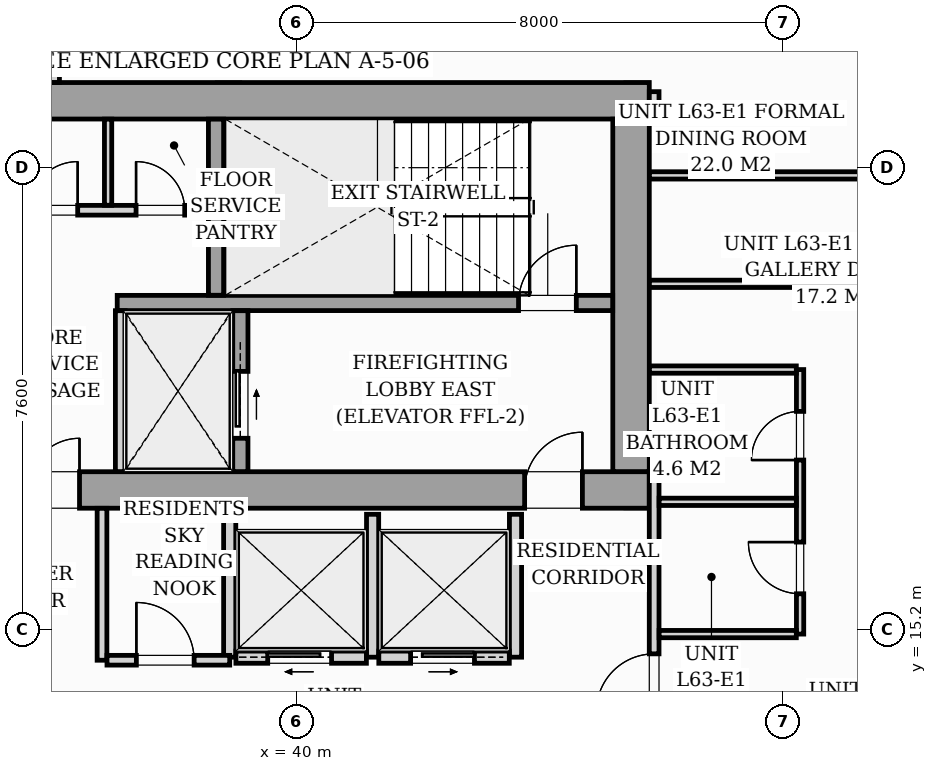
"""IFC4 building model, lengths in metres.
Left out: names, types, materials, properties, quantities, classifications, styles, units other than length and angle.
Written with IfcOpenShell. Run it as: python <this file> out.ifc"""

import sys

from ifc_helpers import new_model, si_unit, direction, frame, frame_2d, origin, origin_2d, place, context, subcontext, project, spatial, rectangle, i_section, extrude, source, transform, mapped, element, fill, save


model = new_model("IFC4")
c1 = context("Model", 3, precision=1e-05, world=origin(), true_north=direction((0.0, 1.0)))
c2 = subcontext(c1, "Body", "Model", "MODEL_VIEW")
j1 = project(units=[si_unit("LENGTHUNIT", "METRE"), si_unit("PLANEANGLEUNIT", "RADIAN")], contexts=[c1])
p1 = place(None, origin())
s1 = spatial("IfcSite", under=j1, at=p1, CompositionType="ELEMENT")
p2 = place(p1, origin())
s2 = spatial("IfcBuilding", under=s1, at=p2, CompositionType="ELEMENT")
p3 = place(p2, frame((0.0, 0.0, 219.9)))
s3 = spatial("IfcBuildingStorey", under=s2, at=p3, CompositionType="ELEMENT", Elevation=219.9)
m1 = source(origin(), c2, "Body", "SweptSolid", [
    extrude(i_section(OverallWidth=0.409, OverallDepth=0.425, WebThickness=0.033, FlangeThickness=0.052, FilletRadius=0.018, at=origin_2d()), origin(), (0.0, 0.0, 1.0), 3.296),
])
for number, where, z_axis, x_axis in (
    (1, (38.88, 17.4, 0.002), (0.0, 0.0, 1.0), (1.0, 0.0, 0.0)),
    (2, (45.6, 17.4, 0.002), (0.0, 0.0, 1.0), (1.0, 0.0, 0.0)),
    (3, (38.88, 24.0, 0.002), (0.0, 0.0, 1.0), (1.0, 0.0, 0.0)),
    (4, (45.6, 24.0, 0.002), (0.0, 0.0, 1.0), (1.0, 0.0, 0.0)),
):
    element("IfcColumn", number, at=place(p3, frame(where, z_axis=z_axis, x_axis=x_axis)), inside=s3, PredefinedType="PILASTER", context=c2, shape_type="MappedRepresentation", body=[
        mapped(m1, transform((0.0, 0.0, 0.0), scale=1.0)),
    ])
p4 = place(p3, frame((26.2, 17.5, 0.0), z_axis=(0.0, 0.0, 1.0), x_axis=(1.0, 0.0, 0.0)))
e5 = element("IfcWall", 5, at=p4, inside=s3, PredefinedType="SHEAR", context=c2, shape_type="SweptSolid", body=[
    extrude(rectangle(XDim=19.6, YDim=0.6, at=frame_2d((9.8, 0.0))), origin(), (0.0, 0.0, 1.0), 3.3),
])
p5 = place(p4, frame((0.95, 0.0, 0.0)))
e6 = element("IfcOpeningElement", 6, at=p5, cuts=e5, PredefinedType="OPENING", context=c2, shape_type="SweptSolid", body=[
    extrude(rectangle(XDim=0.95, YDim=2.06, at=frame_2d((0.475, 1.03))), frame((0.0, 0.31, 0.0), z_axis=(0.0, -1.0, 0.0), x_axis=(1.0, 0.0, 0.0)), (0.0, 0.0, 1.0), 0.62),
])
p6 = place(p4, frame((9.38, 0.0, 0.0)))
e7 = element("IfcOpeningElement", 7, at=p6, cuts=e5, PredefinedType="OPENING", context=c2, shape_type="SweptSolid", body=[
    extrude(rectangle(XDim=0.85, YDim=2.0, at=frame_2d((0.425, 1.0))), frame((0.0, 0.31, 0.0), z_axis=(0.0, -1.0, 0.0), x_axis=(1.0, 0.0, 0.0)), (0.0, 0.0, 1.0), 0.62),
])
p7 = place(p4, frame((17.55, 0.0, 0.0)))
e8 = element("IfcOpeningElement", 8, at=p7, cuts=e5, PredefinedType="OPENING", context=c2, shape_type="SweptSolid", body=[
    extrude(rectangle(XDim=0.95, YDim=2.06, at=frame_2d((0.475, 1.03))), frame((0.0, 0.31, 0.0), z_axis=(0.0, -1.0, 0.0), x_axis=(1.0, 0.0, 0.0)), (0.0, 0.0, 1.0), 0.62),
])
p8 = place(p3, frame((26.2, 23.9, 0.0), z_axis=(0.0, 0.0, 1.0), x_axis=(1.0, 0.0, 0.0)))
e9 = element("IfcWall", 9, at=p8, inside=s3, PredefinedType="SHEAR", context=c2, shape_type="SweptSolid", body=[
    extrude(rectangle(XDim=19.6, YDim=0.6, at=frame_2d((9.8, 0.0))), origin(), (0.0, 0.0, 1.0), 3.3),
])
p9 = place(p3, frame((45.5, 17.802, 0.0), z_axis=(0.0, 0.0, 1.0), x_axis=(0.0, 1.0, 0.0)))
e10 = element("IfcWall", 10, at=p9, inside=s3, PredefinedType="SHEAR", context=c2, shape_type="SweptSolid", body=[
    extrude(rectangle(XDim=5.796, YDim=0.6, at=frame_2d((2.898, 0.0))), origin(), (0.0, 0.0, 1.0), 3.3),
])
p10 = place(p3, frame((37.05, 20.575, 0.0), z_axis=(0.0, 0.0, 1.0), x_axis=(1.0, 0.0, 0.0)))
e11 = element("IfcWall", 11, at=p10, inside=s3, PredefinedType="SOLIDWALL", context=c2, shape_type="SweptSolid", body=[
    extrude(rectangle(XDim=8.148, YDim=0.25, at=frame_2d((4.074, 0.0))), origin(), (0.0, 0.0, 1.0), 3.3),
])
p11 = place(p10, frame((6.6, 0.0, 0.0)))
e12 = element("IfcOpeningElement", 12, at=p11, cuts=e11, PredefinedType="OPENING", context=c2, shape_type="SweptSolid", body=[
    extrude(rectangle(XDim=0.95, YDim=2.06, at=frame_2d((0.475, 1.03))), frame((0.0, 0.135, 0.0), z_axis=(0.0, -1.0, 0.0), x_axis=(1.0, 0.0, 0.0)), (0.0, 0.0, 1.0), 0.27),
])
p12 = place(p3, frame((38.675, 20.702, 0.0), z_axis=(0.0, 0.0, 1.0), x_axis=(0.0, 1.0, 0.0)))
e13 = element("IfcWall", 13, at=p12, inside=s3, PredefinedType="SOLIDWALL", context=c2, shape_type="SweptSolid", body=[
    extrude(rectangle(XDim=2.896, YDim=0.25, at=frame_2d((1.448, 0.0))), origin(), (0.0, 0.0, 1.0), 3.3),
])
p13 = place(p3, frame((37.1, 17.802, 0.0), z_axis=(0.0, 0.0, 1.0), x_axis=(0.0, 1.0, 0.0)))
e14 = element("IfcWall", 14, at=p13, inside=s3, PredefinedType="PARTITIONING", context=c2, shape_type="SweptSolid", body=[
    extrude(rectangle(XDim=2.646, YDim=0.16, at=frame_2d((1.323, 0.0))), origin(), (0.0, 0.0, 1.0), 3.04),
])
p14 = place(p3, frame((39.075, 17.802, 0.0), z_axis=(0.0, 0.0, 1.0), x_axis=(0.0, 1.0, 0.0)))
e15 = element("IfcWall", 15, at=p14, inside=s3, PredefinedType="SOLIDWALL", context=c2, shape_type="SweptSolid", body=[
    extrude(rectangle(XDim=2.646, YDim=0.25, at=frame_2d((1.323, 0.0))), origin(), (0.0, 0.0, 1.0), 3.3),
])
p15 = place(p14, frame((0.548, 0.0, 0.0)))
e16 = element("IfcOpeningElement", 16, at=p15, cuts=e15, PredefinedType="OPENING", context=c2, shape_type="SweptSolid", body=[
    extrude(rectangle(XDim=1.1, YDim=2.08, at=frame_2d((0.55, 1.04))), frame((0.0, 0.135, 0.0), z_axis=(0.0, -1.0, 0.0), x_axis=(1.0, 0.0, 0.0)), (0.0, 0.0, 1.0), 0.27),
])
p16 = place(p3, frame((33.452, 22.1, 0.0), z_axis=(0.0, 0.0, 1.0), x_axis=(1.0, 0.0, 0.0)))
e17 = element("IfcWall", 17, at=p16, inside=s3, PredefinedType="PARTITIONING", context=c2, shape_type="SweptSolid", body=[
    extrude(rectangle(XDim=5.096, YDim=0.16, at=frame_2d((2.548, 0.0))), origin(), (0.0, 0.0, 1.0), 3.04),
])
p17 = place(p16, frame((0.388, 0.0, 0.0)))
e18 = element("IfcOpeningElement", 18, at=p17, cuts=e17, PredefinedType="OPENING", context=c2, shape_type="SweptSolid", body=[
    extrude(rectangle(XDim=0.8, YDim=2.05, at=frame_2d((0.4, 1.025))), frame((0.0, 0.09, 0.0), z_axis=(0.0, -1.0, 0.0), x_axis=(1.0, 0.0, 0.0)), (0.0, 0.0, 1.0), 0.18),
])
p18 = place(p16, frame((2.148, 0.0, 0.0)))
e19 = element("IfcOpeningElement", 19, at=p18, cuts=e17, PredefinedType="OPENING", context=c2, shape_type="SweptSolid", body=[
    extrude(rectangle(XDim=0.8, YDim=2.05, at=frame_2d((0.4, 1.025))), frame((0.0, 0.09, 0.0), z_axis=(0.0, -1.0, 0.0), x_axis=(1.0, 0.0, 0.0)), (0.0, 0.0, 1.0), 0.18),
])
p19 = place(p16, frame((3.908, 0.0, 0.0)))
e20 = element("IfcOpeningElement", 20, at=p19, cuts=e17, PredefinedType="OPENING", context=c2, shape_type="SweptSolid", body=[
    extrude(rectangle(XDim=0.8, YDim=2.05, at=frame_2d((0.4, 1.025))), frame((0.0, 0.09, 0.0), z_axis=(0.0, -1.0, 0.0), x_axis=(1.0, 0.0, 0.0)), (0.0, 0.0, 1.0), 0.18),
])
p20 = place(p3, frame((36.9, 22.182, 0.0), z_axis=(0.0, 0.0, 1.0), x_axis=(0.0, 1.0, 0.0)))
e21 = element("IfcWall", 21, at=p20, inside=s3, PredefinedType="PARTITIONING", context=c2, shape_type="SweptSolid", body=[
    extrude(rectangle(XDim=1.416, YDim=0.12, at=frame_2d((0.708, 0.0))), origin(), (0.0, 0.0, 1.0), 3.04),
])
for number, where, z_axis, x_axis in (
    (22, (38.9, 14.75, 0.0), (0.0, 0.0, 1.0), (0.0, 1.0, 0.0)),
    (23, (41.25, 14.75, 0.0), (0.0, 0.0, 1.0), (0.0, 1.0, 0.0)),
    (24, (43.6, 14.75, 0.0), (0.0, 0.0, 1.0), (0.0, 1.0, 0.0)),
):
    element("IfcWall", number, at=place(p3, frame(where, z_axis=z_axis, x_axis=x_axis)), inside=s3, PredefinedType="PARTITIONING", context=c2, shape_type="SweptSolid", body=[
        extrude(rectangle(XDim=2.35, YDim=0.2, at=frame_2d((1.175, 0.0))), origin(), (0.0, 0.0, 1.0), 3.04),
    ])
p21 = place(p3, frame((39.002, 14.75, 0.0), z_axis=(0.0, 0.0, 1.0), x_axis=(1.0, 0.0, 0.0)))
e25 = element("IfcWall", 25, at=p21, inside=s3, PredefinedType="PARTITIONING", context=c2, shape_type="SweptSolid", body=[
    extrude(rectangle(XDim=2.146, YDim=0.2, at=frame_2d((1.073, 0.0))), origin(), (0.0, 0.0, 1.0), 3.04),
])
p22 = place(p21, frame((0.523, 0.0, 0.0)))
e26 = element("IfcOpeningElement", 26, at=p22, cuts=e25, PredefinedType="OPENING", context=c2, shape_type="SweptSolid", body=[
    extrude(rectangle(XDim=1.05, YDim=2.08, at=frame_2d((0.525, 1.04))), frame((0.0, 0.11, 0.0), z_axis=(0.0, -1.0, 0.0), x_axis=(1.0, 0.0, 0.0)), (0.0, 0.0, 1.0), 0.22),
])
p23 = place(p3, frame((41.352, 14.75, 0.0), z_axis=(0.0, 0.0, 1.0), x_axis=(1.0, 0.0, 0.0)))
e27 = element("IfcWall", 27, at=p23, inside=s3, PredefinedType="PARTITIONING", context=c2, shape_type="SweptSolid", body=[
    extrude(rectangle(XDim=2.146, YDim=0.2, at=frame_2d((1.073, 0.0))), origin(), (0.0, 0.0, 1.0), 3.04),
])
p24 = place(p23, frame((0.523, 0.0, 0.0)))
e28 = element("IfcOpeningElement", 28, at=p24, cuts=e27, PredefinedType="OPENING", context=c2, shape_type="SweptSolid", body=[
    extrude(rectangle(XDim=1.05, YDim=2.08, at=frame_2d((0.525, 1.04))), frame((0.0, 0.11, 0.0), z_axis=(0.0, -1.0, 0.0), x_axis=(1.0, 0.0, 0.0)), (0.0, 0.0, 1.0), 0.22),
])
p25 = place(p3, frame((45.88, 13.362, 0.0), z_axis=(0.0, 0.0, 1.0), x_axis=(0.0, 1.0, 0.0)))
e29 = element("IfcWall", 29, at=p25, inside=s3, PredefinedType="PARTITIONING", context=c2, shape_type="SweptSolid", body=[
    extrude(rectangle(XDim=4.44, YDim=0.16, at=frame_2d((2.22, 0.0))), origin(), (0.0, 0.0, 1.0), 3.04),
])
p26 = place(p25, frame((0.493, 0.0, 0.0)))
e30 = element("IfcOpeningElement", 30, at=p26, cuts=e29, PredefinedType="OPENING", context=c2, shape_type="SweptSolid", body=[
    extrude(rectangle(XDim=0.95, YDim=2.06, at=frame_2d((0.475, 1.03))), frame((0.0, 0.09, 0.0), z_axis=(0.0, -1.0, 0.0), x_axis=(1.0, 0.0, 0.0)), (0.0, 0.0, 1.0), 0.18),
])
p27 = place(p3, frame((45.88, 23.598, 0.0), z_axis=(0.0, 0.0, 1.0), x_axis=(0.0, 1.0, 0.0)))
e31 = element("IfcWall", 31, at=p27, inside=s3, PredefinedType="PARTITIONING", context=c2, shape_type="SweptSolid", body=[
    extrude(rectangle(XDim=0.452, YDim=0.16, at=frame_2d((0.226, 0.0))), origin(), (0.0, 0.0, 1.0), 3.04),
])
p28 = place(p3, frame((36.0, 24.202, 0.0), z_axis=(0.0, 0.0, 1.0), x_axis=(0.0, 1.0, 0.0)))
e32 = element("IfcWall", 32, at=p28, inside=s3, PredefinedType="PARTITIONING", context=c2, shape_type="SweptSolid", body=[
    extrude(rectangle(XDim=2.363, YDim=0.2, at=frame_2d((1.182, 0.0))), origin(), (0.0, 0.0, 1.0), 3.04),
])
p29 = place(p3, frame((48.28, 15.13, 0.0), z_axis=(0.0, 0.0, 1.0), x_axis=(0.0, 1.0, 0.0)))
e33 = element("IfcWall", 33, at=p29, inside=s3, PredefinedType="PARTITIONING", context=c2, shape_type="SweptSolid", body=[
    extrude(rectangle(XDim=4.35, YDim=0.12, at=frame_2d((2.175, 0.0))), origin(), (0.0, 0.0, 1.0), 3.04),
])
p30 = place(p29, frame((0.663, 0.0, 0.0)))
e34 = element("IfcOpeningElement", 34, at=p30, cuts=e33, PredefinedType="OPENING", context=c2, shape_type="SweptSolid", body=[
    extrude(rectangle(XDim=0.85, YDim=2.05, at=frame_2d((0.425, 1.025))), frame((0.0, 0.07, 0.0), z_axis=(0.0, -1.0, 0.0), x_axis=(1.0, 0.0, 0.0)), (0.0, 0.0, 1.0), 0.14),
])
p31 = place(p29, frame((2.862, 0.0, 0.0)))
e35 = element("IfcOpeningElement", 35, at=p31, cuts=e33, PredefinedType="OPENING", context=c2, shape_type="SweptSolid", body=[
    extrude(rectangle(XDim=0.8, YDim=2.02, at=frame_2d((0.4, 1.01))), frame((0.0, 0.07, 0.0), z_axis=(0.0, -1.0, 0.0), x_axis=(1.0, 0.0, 0.0)), (0.0, 0.0, 1.0), 0.14),
])
p32 = place(p3, frame((45.962, 17.305, 0.0), z_axis=(0.0, 0.0, 1.0), x_axis=(1.0, 0.0, 0.0)))
e36 = element("IfcWall", 36, at=p32, inside=s3, PredefinedType="PARTITIONING", context=c2, shape_type="SweptSolid", body=[
    extrude(rectangle(XDim=2.256, YDim=0.12, at=frame_2d((1.128, 0.0))), origin(), (0.0, 0.0, 1.0), 2.382),
])
p33 = place(p3, frame((45.962, 15.13, 0.0), z_axis=(0.0, 0.0, 1.0), x_axis=(1.0, 0.0, 0.0)))
e37 = element("IfcWall", 37, at=p33, inside=s3, PredefinedType="PARTITIONING", context=c2, shape_type="SweptSolid", body=[
    extrude(rectangle(XDim=2.256, YDim=0.12, at=frame_2d((1.128, 0.0))), origin(), (0.0, 0.0, 1.0), 3.04),
])
p34 = place(p3, frame((45.802, 19.48, 0.0), z_axis=(0.0, 0.0, 1.0), x_axis=(1.0, 0.0, 0.0)))
e38 = element("IfcWall", 38, at=p34, inside=s3, PredefinedType="PARTITIONING", context=c2, shape_type="SweptSolid", body=[
    extrude(rectangle(XDim=2.416, YDim=0.12, at=frame_2d((1.208, 0.0))), origin(), (0.0, 0.0, 1.0), 3.04),
])
p35 = place(p3, frame((45.802, 22.673, 0.0), z_axis=(0.0, 0.0, 1.0), x_axis=(1.0, 0.0, 0.0)))
e39 = element("IfcWall", 39, at=p35, inside=s3, PredefinedType="PARTITIONING", context=c2, shape_type="SweptSolid", body=[
    extrude(rectangle(XDim=9.402, YDim=0.12, at=frame_2d((4.701, 0.0))), origin(), (0.0, 0.0, 1.0), 3.04),
])
p36 = place(p35, frame((4.397, 0.0, 0.0)))
e40 = element("IfcOpeningElement", 40, at=p36, cuts=e39, PredefinedType="OPENING", context=c2, shape_type="SweptSolid", body=[
    extrude(rectangle(XDim=0.85, YDim=2.05, at=frame_2d((0.425, 1.025))), frame((0.0, 0.07, 0.0), z_axis=(0.0, -1.0, 0.0), x_axis=(1.0, 0.0, 0.0)), (0.0, 0.0, 1.0), 0.14),
])
p37 = place(p3, frame((45.802, 20.89, 0.0), z_axis=(0.0, 0.0, 1.0), x_axis=(1.0, 0.0, 0.0)))
e41 = element("IfcWall", 41, at=p37, inside=s3, PredefinedType="PARTITIONING", context=c2, shape_type="SweptSolid", body=[
    extrude(rectangle(XDim=10.677, YDim=0.12, at=frame_2d((5.339, 0.0))), origin(), (0.0, 0.0, 1.0), 3.04),
])
p38 = place(p37, frame((5.062, 0.0, 0.0)))
e42 = element("IfcOpeningElement", 42, at=p38, cuts=e41, PredefinedType="OPENING", context=c2, shape_type="SweptSolid", body=[
    extrude(rectangle(XDim=0.85, YDim=2.05, at=frame_2d((0.425, 1.025))), frame((0.0, 0.07, 0.0), z_axis=(0.0, -1.0, 0.0), x_axis=(1.0, 0.0, 0.0)), (0.0, 0.0, 1.0), 0.14),
])
p39 = place(p3, frame((36.8, 14.7, 0.0), z_axis=(0.0, 0.0, 1.0), x_axis=(0.0, 1.0, 0.0)))
e43 = element("IfcWall", 43, at=p39, inside=s3, PredefinedType="PARTITIONING", context=c2, shape_type="SweptSolid", body=[
    extrude(rectangle(XDim=2.498, YDim=0.16, at=frame_2d((1.249, 0.0))), origin(), (0.0, 0.0, 1.0), 3.04),
])
p40 = place(p3, frame((36.882, 14.7, 0.0), z_axis=(0.0, 0.0, 1.0), x_axis=(1.0, 0.0, 0.0)))
e44 = element("IfcWall", 44, at=p40, inside=s3, PredefinedType="PARTITIONING", context=c2, shape_type="SweptSolid", body=[
    extrude(rectangle(XDim=2.018, YDim=0.16, at=frame_2d((1.009, 0.0))), origin(), (0.0, 0.0, 1.0), 3.04),
])
p41 = place(p40, frame((0.483, 0.0, 0.0)))
e45 = element("IfcOpeningElement", 45, at=p41, cuts=e44, PredefinedType="OPENING", context=c2, shape_type="SweptSolid", body=[
    extrude(rectangle(XDim=0.95, YDim=2.06, at=frame_2d((0.475, 1.03))), frame((0.0, 0.09, 0.0), z_axis=(0.0, -1.0, 0.0), x_axis=(1.0, 0.0, 0.0)), (0.0, 0.0, 1.0), 0.18),
])
m2 = source(origin(), c2, "Body", "SweptSolid", [
    extrude(rectangle(XDim=0.85, YDim=2.0, at=frame_2d((0.425, 1.0))), frame((0.0, 0.025, 0.0), z_axis=(0.0, -1.0, 0.0), x_axis=(1.0, 0.0, 0.0)), (0.0, 0.0, 1.0), 0.05),
])
p42 = place(p6, origin())
e46 = element("IfcDoor", 46, at=p42, inside=s3, OperationType="SINGLE_SWING_RIGHT", PredefinedType="DOOR", context=c2, shape_type="MappedRepresentation", body=[
    mapped(m2, transform((0.0, 0.0, 0.0), scale=1.0)),
])
fill(e7, e46)
m3 = source(origin(), c2, "Body", "SweptSolid", [
    extrude(rectangle(XDim=0.95, YDim=2.06, at=frame_2d((0.475, 1.03))), frame((0.0, 0.025, 0.0), z_axis=(0.0, -1.0, 0.0), x_axis=(1.0, 0.0, 0.0)), (0.0, 0.0, 1.0), 0.05),
])
p43 = place(p7, origin())
e47 = element("IfcDoor", 47, at=p43, inside=s3, OperationType="SINGLE_SWING_RIGHT", PredefinedType="DOOR", context=c2, shape_type="MappedRepresentation", body=[
    mapped(m3, transform((0.0, 0.0, 0.0), scale=1.0)),
])
fill(e8, e47)
p44 = place(p11, origin())
e48 = element("IfcDoor", 48, at=p44, inside=s3, OperationType="SINGLE_SWING_RIGHT", PredefinedType="DOOR", context=c2, shape_type="MappedRepresentation", body=[
    mapped(m3, transform((0.0, 0.0, 0.0), scale=1.0)),
])
fill(e12, e48)
m4 = source(origin(), c2, "Body", "SweptSolid", [
    extrude(rectangle(XDim=1.1, YDim=2.08, at=frame_2d((0.55, 1.04))), frame((0.0, 0.025, 0.0), z_axis=(0.0, -1.0, 0.0), x_axis=(1.0, 0.0, 0.0)), (0.0, 0.0, 1.0), 0.05),
])
p45 = place(p15, origin())
e49 = element("IfcDoor", 49, at=p45, inside=s3, OperationType="SLIDING_TO_RIGHT", PredefinedType="DOOR", context=c2, shape_type="MappedRepresentation", body=[
    mapped(m4, transform((0.0, 0.0, 0.0), scale=1.0)),
])
fill(e16, e49)
m5 = source(origin(), c2, "Body", "SweptSolid", [
    extrude(rectangle(XDim=0.8, YDim=2.05, at=frame_2d((0.4, 1.025))), frame((0.0, 0.025, 0.0), z_axis=(0.0, -1.0, 0.0), x_axis=(1.0, 0.0, 0.0)), (0.0, 0.0, 1.0), 0.05),
])
p46 = place(p18, origin())
e50 = element("IfcDoor", 50, at=p46, inside=s3, OperationType="SINGLE_SWING_RIGHT", PredefinedType="DOOR", context=c2, shape_type="MappedRepresentation", body=[
    mapped(m5, transform((0.0, 0.0, 0.0), scale=1.0)),
])
fill(e19, e50)
p47 = place(p19, origin())
e51 = element("IfcDoor", 51, at=p47, inside=s3, OperationType="SINGLE_SWING_LEFT", PredefinedType="DOOR", context=c2, shape_type="MappedRepresentation", body=[
    mapped(m5, transform((0.0, 0.0, 0.0), scale=1.0)),
])
fill(e20, e51)
m6 = source(origin(), c2, "Body", "SweptSolid", [
    extrude(rectangle(XDim=1.05, YDim=2.08, at=frame_2d((0.525, 1.04))), frame((0.0, 0.025, 0.0), z_axis=(0.0, -1.0, 0.0), x_axis=(1.0, 0.0, 0.0)), (0.0, 0.0, 1.0), 0.05),
])
p48 = place(p22, origin())
e52 = element("IfcDoor", 52, at=p48, inside=s3, OperationType="SLIDING_TO_LEFT", PredefinedType="DOOR", context=c2, shape_type="MappedRepresentation", body=[
    mapped(m6, transform((0.0, 0.0, 0.0), scale=1.0)),
])
fill(e26, e52)
p49 = place(p24, origin())
e53 = element("IfcDoor", 53, at=p49, inside=s3, OperationType="SLIDING_TO_RIGHT", PredefinedType="DOOR", context=c2, shape_type="MappedRepresentation", body=[
    mapped(m6, transform((0.0, 0.0, 0.0), scale=1.0)),
])
fill(e28, e53)
m7 = source(origin(), c2, "Body", "SweptSolid", [
    extrude(rectangle(XDim=0.95, YDim=2.06, at=frame_2d((0.475, 1.03))), frame((0.0, 0.025, 0.0), z_axis=(0.0, -1.0, 0.0), x_axis=(1.0, 0.0, 0.0)), (0.0, 0.0, 1.0), 0.05),
])
p50 = place(p26, origin())
e54 = element("IfcDoor", 54, at=p50, inside=s3, OperationType="SINGLE_SWING_LEFT", PredefinedType="DOOR", context=c2, shape_type="MappedRepresentation", body=[
    mapped(m7, transform((0.0, 0.0, 0.0), scale=1.0)),
])
fill(e30, e54)
m8 = source(origin(), c2, "Body", "SweptSolid", [
    extrude(rectangle(XDim=0.85, YDim=2.05, at=frame_2d((0.425, 1.025))), frame((0.0, 0.025, 0.0), z_axis=(0.0, -1.0, 0.0), x_axis=(1.0, 0.0, 0.0)), (0.0, 0.0, 1.0), 0.05),
])
p51 = place(p30, origin())
e55 = element("IfcDoor", 55, at=p51, inside=s3, OperationType="SINGLE_SWING_RIGHT", PredefinedType="DOOR", context=c2, shape_type="MappedRepresentation", body=[
    mapped(m8, transform((0.0, 0.0, 0.0), scale=1.0)),
])
fill(e34, e55)
m9 = source(origin(), c2, "Body", "SweptSolid", [
    extrude(rectangle(XDim=0.8, YDim=2.02, at=frame_2d((0.4, 1.01))), frame((0.0, 0.025, 0.0), z_axis=(0.0, -1.0, 0.0), x_axis=(1.0, 0.0, 0.0)), (0.0, 0.0, 1.0), 0.05),
])
p52 = place(p31, origin())
e56 = element("IfcDoor", 56, at=p52, inside=s3, OperationType="SINGLE_SWING_LEFT", PredefinedType="DOOR", context=c2, shape_type="MappedRepresentation", body=[
    mapped(m9, transform((0.0, 0.0, 0.0), scale=1.0)),
])
fill(e35, e56)
p53 = place(p41, origin())
e57 = element("IfcDoor", 57, at=p53, inside=s3, OperationType="SINGLE_SWING_LEFT", PredefinedType="DOOR", context=c2, shape_type="MappedRepresentation", body=[
    mapped(m7, transform((0.0, 0.0, 0.0), scale=1.0)),
])
fill(e45, e57)
save(model, sys.argv[1])
